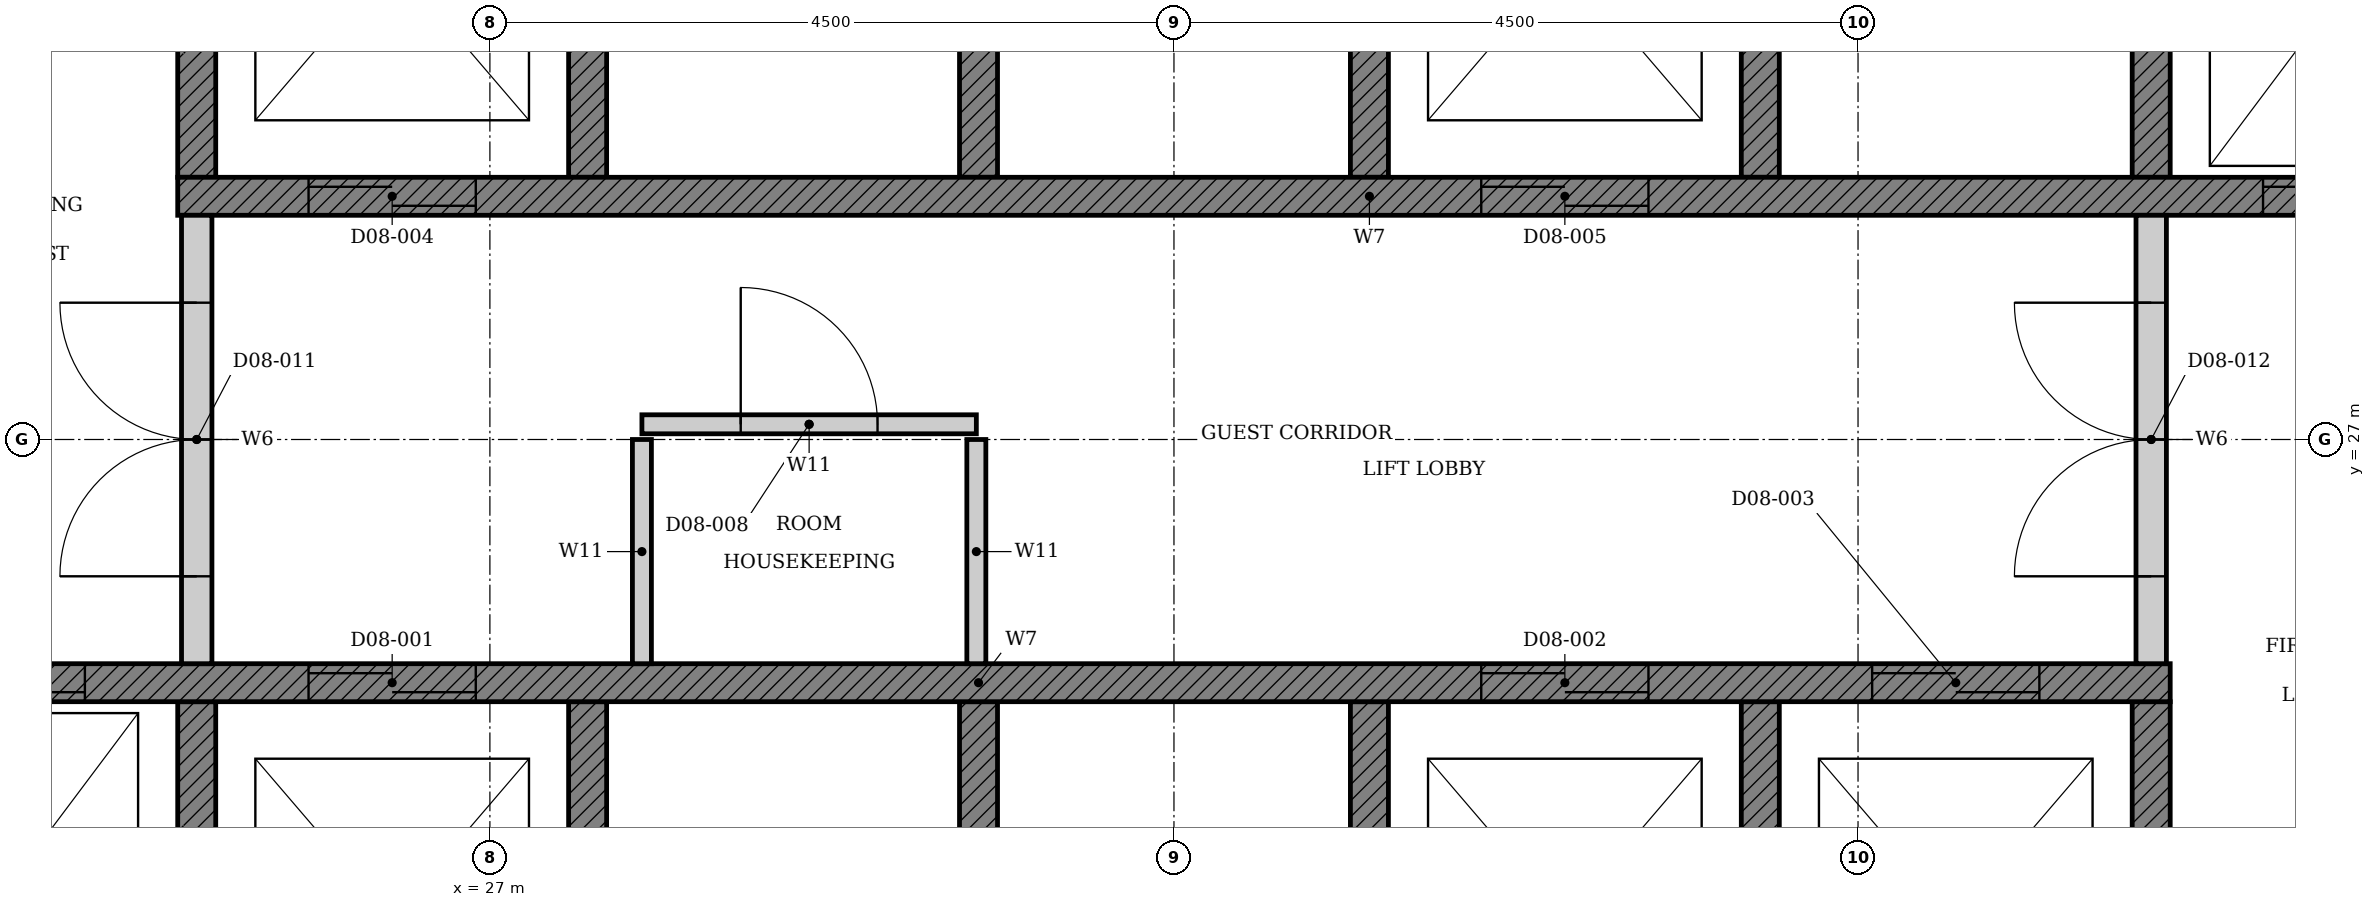
"""IFC4 building model, lengths in metres.
Left out: names, types, materials, properties, quantities, classifications, styles, units other than length and angle.
Written with IfcOpenShell. Run it as: python <this file> out.ifc"""

import sys

from ifc_helpers import new_model, si_unit, direction, frame, frame_2d, origin, place, context, subcontext, project, spatial, polyline, rectangle, outline, extrude, element, fill, save


model = new_model("IFC4")
c1 = context("Model", 3, precision=1e-05, world=origin(), true_north=direction((0.0, 1.0)))
c2 = subcontext(c1, "Body", "Model", "MODEL_VIEW")
j1 = project(units=[si_unit("LENGTHUNIT", "METRE"), si_unit("PLANEANGLEUNIT", "RADIAN")], contexts=[c1])
p1 = place(None, origin())
s1 = spatial("IfcSite", under=j1, at=p1, CompositionType="ELEMENT")
p2 = place(p1, origin())
s2 = spatial("IfcBuilding", under=s1, at=p2, CompositionType="ELEMENT")
p3 = place(p2, frame((0.0, 0.0, 40.8)))
s3 = spatial("IfcBuildingStorey", under=s2, at=p3, CompositionType="ELEMENT", Elevation=40.8)
p4 = place(p3, origin())
e1 = element("IfcWall", 1, at=p4, inside=s3, PredefinedType="SHEAR", context=c2, shape_type="SweptSolid", body=[
    extrude(outline(polyline([(22.375, 22.35), (38.053, 22.35), (38.053, 25.275), (37.803, 25.275), (37.803, 22.65), (35.482, 22.65), (35.482, 25.275), (35.232, 25.275), (35.232, 22.65), (32.911, 22.65), (32.911, 25.275), (32.661, 25.275), (32.661, 22.65), (30.339, 22.65), (30.339, 25.275), (30.089, 25.275), (30.089, 22.65), (27.768, 22.65), (27.768, 25.275), (27.518, 25.275), (27.518, 22.65), (25.197, 22.65), (25.197, 25.275), (24.947, 25.275), (24.947, 22.65), (22.625, 22.65), (22.625, 25.275), (22.375, 25.275), (22.375, 22.35)])), origin(), (0.0, 0.0, 1.0), 3.3),
])
p5 = place(p3, origin())
e2 = element("IfcWall", 2, at=p5, inside=s3, PredefinedType="SHEAR", context=c2, shape_type="SweptSolid", body=[
    extrude(outline(polyline([(24.947, 28.725), (25.197, 28.725), (25.197, 31.35), (27.518, 31.35), (27.518, 28.725), (27.768, 28.725), (27.768, 31.35), (30.089, 31.35), (30.089, 28.725), (30.339, 28.725), (30.339, 31.35), (32.661, 31.35), (32.661, 28.725), (32.911, 28.725), (32.911, 31.35), (35.232, 31.35), (35.232, 28.725), (35.482, 28.725), (35.482, 31.35), (37.803, 31.35), (37.803, 28.725), (38.053, 28.725), (38.053, 31.35), (40.375, 31.35), (40.375, 28.725), (40.625, 28.725), (40.625, 31.65), (24.947, 31.65), (24.947, 28.725)])), origin(), (0.0, 0.0, 1.0), 3.3),
])
p6 = place(p3, frame((22.375, 25.4, 0.0), z_axis=(0.0, 0.0, 1.0), x_axis=(1.0, 0.0, 0.0)))
e3 = element("IfcWall", 3, at=p6, inside=s3, PredefinedType="SHEAR", context=c2, shape_type="SweptSolid", body=[
    extrude(rectangle(XDim=15.678, YDim=0.25, at=frame_2d((7.839, 0.0))), origin(), (0.0, 0.0, 1.0), 3.3),
])
p7 = place(p6, frame((3.432, 0.0, 0.0)))
e4 = element("IfcOpeningElement", 4, at=p7, cuts=e3, PredefinedType="OPENING", context=c2, shape_type="SweptSolid", body=[
    extrude(rectangle(XDim=1.1, YDim=2.1, at=frame_2d((0.55, 1.05))), frame((0.0, 0.135, 0.0), z_axis=(0.0, -1.0, 0.0), x_axis=(1.0, 0.0, 0.0)), (0.0, 0.0, 1.0), 0.27),
])
p8 = place(p6, frame((11.146, 0.0, 0.0)))
e5 = element("IfcOpeningElement", 5, at=p8, cuts=e3, PredefinedType="OPENING", context=c2, shape_type="SweptSolid", body=[
    extrude(rectangle(XDim=1.1, YDim=2.1, at=frame_2d((0.55, 1.05))), frame((0.0, 0.135, 0.0), z_axis=(0.0, -1.0, 0.0), x_axis=(1.0, 0.0, 0.0)), (0.0, 0.0, 1.0), 0.27),
])
p9 = place(p6, frame((13.718, 0.0, 0.0)))
e6 = element("IfcOpeningElement", 6, at=p9, cuts=e3, PredefinedType="OPENING", context=c2, shape_type="SweptSolid", body=[
    extrude(rectangle(XDim=1.1, YDim=2.1, at=frame_2d((0.55, 1.05))), frame((0.0, 0.135, 0.0), z_axis=(0.0, -1.0, 0.0), x_axis=(1.0, 0.0, 0.0)), (0.0, 0.0, 1.0), 0.27),
])
p10 = place(p6, frame((0.861, 0.0, 0.0)))
e7 = element("IfcOpeningElement", 7, at=p10, cuts=e3, PredefinedType="OPENING", context=c2, shape_type="SweptSolid", body=[
    extrude(rectangle(XDim=1.1, YDim=2.1, at=frame_2d((0.55, 1.05))), frame((0.0, 0.135, 0.0), z_axis=(0.0, -1.0, 0.0), x_axis=(1.0, 0.0, 0.0)), (0.0, 0.0, 1.0), 0.27),
])
p11 = place(p3, frame((24.947, 28.6, 0.0), z_axis=(0.0, 0.0, 1.0), x_axis=(1.0, 0.0, 0.0)))
e8 = element("IfcWall", 8, at=p11, inside=s3, PredefinedType="SHEAR", context=c2, shape_type="SweptSolid", body=[
    extrude(rectangle(XDim=15.678, YDim=0.25, at=frame_2d((7.839, 0.0))), origin(), (0.0, 0.0, 1.0), 3.3),
])
p12 = place(p11, frame((0.861, 0.0, 0.0)))
e9 = element("IfcOpeningElement", 9, at=p12, cuts=e8, PredefinedType="OPENING", context=c2, shape_type="SweptSolid", body=[
    extrude(rectangle(XDim=1.1, YDim=2.1, at=frame_2d((0.55, 1.05))), frame((0.0, 0.135, 0.0), z_axis=(0.0, -1.0, 0.0), x_axis=(1.0, 0.0, 0.0)), (0.0, 0.0, 1.0), 0.27),
])
p13 = place(p11, frame((8.575, 0.0, 0.0)))
e10 = element("IfcOpeningElement", 10, at=p13, cuts=e8, PredefinedType="OPENING", context=c2, shape_type="SweptSolid", body=[
    extrude(rectangle(XDim=1.1, YDim=2.1, at=frame_2d((0.55, 1.05))), frame((0.0, 0.135, 0.0), z_axis=(0.0, -1.0, 0.0), x_axis=(1.0, 0.0, 0.0)), (0.0, 0.0, 1.0), 0.27),
])
p14 = place(p11, frame((13.718, 0.0, 0.0)))
e11 = element("IfcOpeningElement", 11, at=p14, cuts=e8, PredefinedType="OPENING", context=c2, shape_type="SweptSolid", body=[
    extrude(rectangle(XDim=1.1, YDim=2.1, at=frame_2d((0.55, 1.05))), frame((0.0, 0.135, 0.0), z_axis=(0.0, -1.0, 0.0), x_axis=(1.0, 0.0, 0.0)), (0.0, 0.0, 1.0), 0.27),
])
p15 = place(p3, frame((28.0, 27.1, 0.0), z_axis=(0.0, 0.0, 1.0), x_axis=(1.0, 0.0, 0.0)))
e12 = element("IfcWall", 12, at=p15, inside=s3, PredefinedType="PARTITIONING", context=c2, shape_type="SweptSolid", body=[
    extrude(rectangle(XDim=2.2, YDim=0.125, at=frame_2d((1.1, 0.0))), origin(), (0.0, 0.0, 1.0), 3.3),
])
p16 = place(p15, frame((0.65, 0.0, 0.0)))
e13 = element("IfcOpeningElement", 13, at=p16, cuts=e12, PredefinedType="OPENING", context=c2, shape_type="SweptSolid", body=[
    extrude(rectangle(XDim=0.9, YDim=2.1, at=frame_2d((0.45, 1.05))), frame((0.0, 0.073, 0.0), z_axis=(0.0, -1.0, 0.0), x_axis=(1.0, 0.0, 0.0)), (0.0, 0.0, 1.0), 0.145),
])
for number, where, z_axis, x_axis in (
    (14, (28.0, 25.525, 0.0), (0.0, 0.0, 1.0), (0.0, 1.0, 0.0)),
    (15, (30.2, 25.525, 0.0), (0.0, 0.0, 1.0), (0.0, 1.0, 0.0)),
):
    element("IfcWall", number, at=place(p3, frame(where, z_axis=z_axis, x_axis=x_axis)), inside=s3, PredefinedType="PARTITIONING", context=c2, shape_type="SweptSolid", body=[
        extrude(rectangle(XDim=1.475, YDim=0.125, at=frame_2d((0.738, 0.0))), origin(), (0.0, 0.0, 1.0), 3.3),
    ])
p17 = place(p3, frame((25.072, 25.525, 0.0), z_axis=(0.0, 0.0, 1.0), x_axis=(0.0, 1.0, 0.0)))
e16 = element("IfcWall", 16, at=p17, inside=s3, PredefinedType="PARTITIONING", context=c2, shape_type="SweptSolid", body=[
    extrude(rectangle(XDim=2.95, YDim=0.2, at=frame_2d((1.475, 0.0))), origin(), (0.0, 0.0, 1.0), 3.3),
])
p18 = place(p17, frame((0.575, 0.0, 0.0)))
e17 = element("IfcOpeningElement", 17, at=p18, cuts=e16, PredefinedType="OPENING", context=c2, shape_type="SweptSolid", body=[
    extrude(rectangle(XDim=1.8, YDim=2.1, at=frame_2d((0.9, 1.05))), frame((0.0, 0.11, 0.0), z_axis=(0.0, -1.0, 0.0), x_axis=(1.0, 0.0, 0.0)), (0.0, 0.0, 1.0), 0.22),
])
p19 = place(p3, frame((37.928, 25.525, 0.0), z_axis=(0.0, 0.0, 1.0), x_axis=(0.0, 1.0, 0.0)))
e18 = element("IfcWall", 18, at=p19, inside=s3, PredefinedType="PARTITIONING", context=c2, shape_type="SweptSolid", body=[
    extrude(rectangle(XDim=2.95, YDim=0.2, at=frame_2d((1.475, 0.0))), origin(), (0.0, 0.0, 1.0), 3.3),
])
p20 = place(p19, frame((0.575, 0.0, 0.0)))
e19 = element("IfcOpeningElement", 19, at=p20, cuts=e18, PredefinedType="OPENING", context=c2, shape_type="SweptSolid", body=[
    extrude(rectangle(XDim=1.8, YDim=2.1, at=frame_2d((0.9, 1.05))), frame((0.0, 0.11, 0.0), z_axis=(0.0, -1.0, 0.0), x_axis=(1.0, 0.0, 0.0)), (0.0, 0.0, 1.0), 0.22),
])
p21 = place(p7, origin())
e20 = element("IfcDoor", 20, at=p21, inside=s3, OperationType="DOUBLE_DOOR_SLIDING", PredefinedType="DOOR", context=c2, shape_type="SweptSolid", body=[
    extrude(rectangle(XDim=1.1, YDim=2.1, at=frame_2d((0.55, 1.05))), frame((0.0, 0.025, 0.0), z_axis=(0.0, -1.0, 0.0), x_axis=(1.0, 0.0, 0.0)), (0.0, 0.0, 1.0), 0.05),
])
fill(e4, e20)
p22 = place(p8, origin())
e21 = element("IfcDoor", 21, at=p22, inside=s3, OperationType="DOUBLE_DOOR_SLIDING", PredefinedType="DOOR", context=c2, shape_type="SweptSolid", body=[
    extrude(rectangle(XDim=1.1, YDim=2.1, at=frame_2d((0.55, 1.05))), frame((0.0, 0.025, 0.0), z_axis=(0.0, -1.0, 0.0), x_axis=(1.0, 0.0, 0.0)), (0.0, 0.0, 1.0), 0.05),
])
fill(e5, e21)
p23 = place(p9, origin())
e22 = element("IfcDoor", 22, at=p23, inside=s3, OperationType="DOUBLE_DOOR_SLIDING", PredefinedType="DOOR", context=c2, shape_type="SweptSolid", body=[
    extrude(rectangle(XDim=1.1, YDim=2.1, at=frame_2d((0.55, 1.05))), frame((0.0, 0.025, 0.0), z_axis=(0.0, -1.0, 0.0), x_axis=(1.0, 0.0, 0.0)), (0.0, 0.0, 1.0), 0.05),
])
fill(e6, e22)
p24 = place(p12, origin())
e23 = element("IfcDoor", 23, at=p24, inside=s3, OperationType="DOUBLE_DOOR_SLIDING", PredefinedType="DOOR", context=c2, shape_type="SweptSolid", body=[
    extrude(rectangle(XDim=1.1, YDim=2.1, at=frame_2d((0.55, 1.05))), frame((0.0, 0.025, 0.0), z_axis=(0.0, -1.0, 0.0), x_axis=(1.0, 0.0, 0.0)), (0.0, 0.0, 1.0), 0.05),
])
fill(e9, e23)
p25 = place(p13, origin())
e24 = element("IfcDoor", 24, at=p25, inside=s3, OperationType="DOUBLE_DOOR_SLIDING", PredefinedType="DOOR", context=c2, shape_type="SweptSolid", body=[
    extrude(rectangle(XDim=1.1, YDim=2.1, at=frame_2d((0.55, 1.05))), frame((0.0, 0.025, 0.0), z_axis=(0.0, -1.0, 0.0), x_axis=(1.0, 0.0, 0.0)), (0.0, 0.0, 1.0), 0.05),
])
fill(e10, e24)
p26 = place(p10, origin())
e25 = element("IfcDoor", 25, at=p26, inside=s3, OperationType="DOUBLE_DOOR_SLIDING", PredefinedType="DOOR", context=c2, shape_type="SweptSolid", body=[
    extrude(rectangle(XDim=1.1, YDim=2.1, at=frame_2d((0.55, 1.05))), frame((0.0, 0.025, 0.0), z_axis=(0.0, -1.0, 0.0), x_axis=(1.0, 0.0, 0.0)), (0.0, 0.0, 1.0), 0.05),
])
fill(e7, e25)
p27 = place(p14, origin())
e26 = element("IfcDoor", 26, at=p27, inside=s3, OperationType="DOUBLE_DOOR_SLIDING", PredefinedType="DOOR", context=c2, shape_type="SweptSolid", body=[
    extrude(rectangle(XDim=1.1, YDim=2.1, at=frame_2d((0.55, 1.05))), frame((0.0, 0.025, 0.0), z_axis=(0.0, -1.0, 0.0), x_axis=(1.0, 0.0, 0.0)), (0.0, 0.0, 1.0), 0.05),
])
fill(e11, e26)
p28 = place(p16, origin())
e27 = element("IfcDoor", 27, at=p28, inside=s3, OperationType="SINGLE_SWING_LEFT", PredefinedType="DOOR", context=c2, shape_type="SweptSolid", body=[
    extrude(rectangle(XDim=0.9, YDim=2.1, at=frame_2d((0.45, 1.05))), frame((0.0, 0.025, 0.0), z_axis=(0.0, -1.0, 0.0), x_axis=(1.0, 0.0, 0.0)), (0.0, 0.0, 1.0), 0.05),
])
fill(e13, e27)
p29 = place(p18, origin())
e28 = element("IfcDoor", 28, at=p29, inside=s3, OperationType="DOUBLE_DOOR_SINGLE_SWING", PredefinedType="DOOR", context=c2, shape_type="SweptSolid", body=[
    extrude(rectangle(XDim=1.8, YDim=2.1, at=frame_2d((0.9, 1.05))), frame((0.0, 0.025, 0.0), z_axis=(0.0, -1.0, 0.0), x_axis=(1.0, 0.0, 0.0)), (0.0, 0.0, 1.0), 0.05),
])
fill(e17, e28)
p30 = place(p20, origin())
e29 = element("IfcDoor", 29, at=p30, inside=s3, OperationType="DOUBLE_DOOR_SINGLE_SWING", PredefinedType="DOOR", context=c2, shape_type="SweptSolid", body=[
    extrude(rectangle(XDim=1.8, YDim=2.1, at=frame_2d((0.9, 1.05))), frame((0.0, 0.025, 0.0), z_axis=(0.0, -1.0, 0.0), x_axis=(1.0, 0.0, 0.0)), (0.0, 0.0, 1.0), 0.05),
])
fill(e19, e29)
save(model, sys.argv[1])
